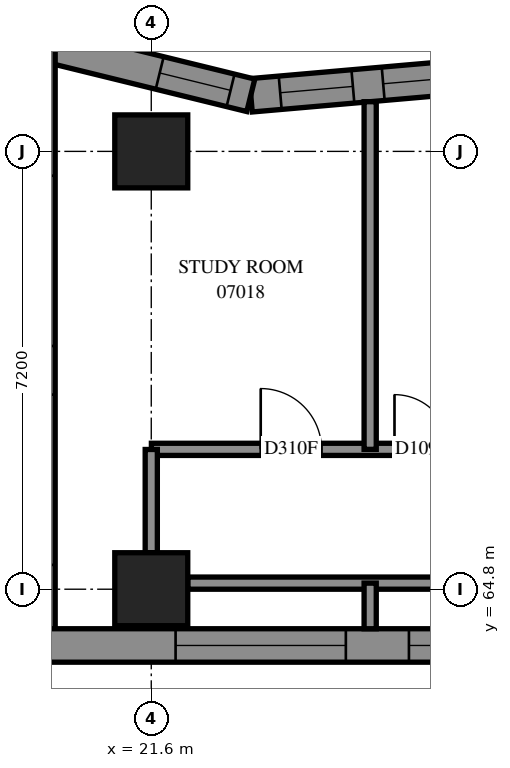
"""IFC4 building model, lengths in metres.
Left out: names, types, materials, properties, quantities, classifications, styles, units other than length and angle.
Written with IfcOpenShell. Run it as: python <this file> out.ifc"""

import sys

from ifc_helpers import new_model, si_unit, direction, frame, frame_2d, origin, origin_2d, place, context, subcontext, project, spatial, polyline, rectangle, outline, extrude, element, fill, save


model = new_model("IFC4")
c1 = context("Model", 3, precision=1e-05, world=origin(), true_north=direction((0.0, 1.0)))
c2 = subcontext(c1, "Body", "Model", "MODEL_VIEW")
j1 = project(units=[si_unit("LENGTHUNIT", "METRE"), si_unit("PLANEANGLEUNIT", "RADIAN")], contexts=[c1])
p1 = place(None, origin())
s1 = spatial("IfcSite", under=j1, at=p1, CompositionType="ELEMENT")
p2 = place(p1, origin())
s2 = spatial("IfcBuilding", under=s1, at=p2, CompositionType="ELEMENT")
p3 = place(p2, frame((0.0, 0.0, 30.4)))
s3 = spatial("IfcBuildingStorey", under=s2, at=p3, CompositionType="ELEMENT", Elevation=30.4)
for number, where, z_axis, x_axis in (
    (1, (21.6, 64.8, 0.0), (0.0, 0.0, 1.0), (1.0, 0.0, 0.0)),
    (2, (21.6, 72.0, 0.0), (0.0, 0.0, 1.0), (1.0, 0.0, 0.0)),
):
    element("IfcColumn", number, at=place(p3, frame(where, z_axis=z_axis, x_axis=x_axis)), inside=s3, PredefinedType="COLUMN", context=c2, shape_type="SweptSolid", body=[
        extrude(rectangle(XDim=1.2, YDim=1.2, at=origin_2d()), origin(), (0.0, 0.0, 1.0), 3.1),
    ])
p4 = place(p3, frame((27.047, 73.254, 0.0), z_axis=(0.0, 0.0, 1.0), x_axis=(-0.9962263466, -0.0867932393, 0.0)))
e3 = element("IfcWall", 3, at=p4, inside=s3, PredefinedType="SOLIDWALL", context=c2, shape_type="SweptSolid", body=[
    extrude(outline(polyline([(-0.024, -0.275), (3.779, -0.275), (3.87, 0.275), (0.024, 0.275), (-0.024, -0.275)])), origin(), (0.0, 0.0, 1.0), 3.1),
])
p5 = place(p4, frame((0.439, 0.0, 0.5)))
e4 = element("IfcOpeningElement", 4, at=p5, cuts=e3, PredefinedType="OPENING", context=c2, shape_type="SweptSolid", body=[
    extrude(rectangle(XDim=1.2, YDim=2.45, at=frame_2d((0.6, 1.225))), frame((0.0, 0.285, 0.0), z_axis=(0.0, -1.0, 0.0), x_axis=(1.0, 0.0, 0.0)), (0.0, 0.0, 1.0), 0.57),
])
p6 = place(p4, frame((2.139, 0.0, 0.5)))
e5 = element("IfcOpeningElement", 5, at=p6, cuts=e3, PredefinedType="OPENING", context=c2, shape_type="SweptSolid", body=[
    extrude(rectangle(XDim=1.2, YDim=2.45, at=frame_2d((0.6, 1.225))), frame((0.0, 0.285, 0.0), z_axis=(0.0, -1.0, 0.0), x_axis=(1.0, 0.0, 0.0)), (0.0, 0.0, 1.0), 0.57),
])
p7 = place(p3, frame((23.237, 72.922, 0.0), z_axis=(0.0, 0.0, 1.0), x_axis=(-0.9711660271, 0.2384041692, 0.0)))
e6 = element("IfcWall", 6, at=p7, inside=s3, PredefinedType="SOLIDWALL", context=c2, shape_type="SweptSolid", body=[
    extrude(outline(polyline([(0.045, -0.275), (3.946, -0.275), (3.245, 0.275), (-0.045, 0.275), (0.045, -0.275)])), origin(), (0.0, 0.0, 1.0), 3.1),
])
p8 = place(p7, frame((0.343, 0.0, 0.5)))
e7 = element("IfcOpeningElement", 7, at=p8, cuts=e6, PredefinedType="OPENING", context=c2, shape_type="SweptSolid", body=[
    extrude(rectangle(XDim=1.2, YDim=2.45, at=frame_2d((0.6, 1.225))), frame((0.0, 0.285, 0.0), z_axis=(0.0, -1.0, 0.0), x_axis=(1.0, 0.0, 0.0)), (0.0, 0.0, 1.0), 0.57),
])
p9 = place(p3, frame((19.745, 73.779, 0.0), z_axis=(0.0, 0.0, 1.0), x_axis=(0.0, -1.0, 0.0)))
e8 = element("IfcWall", 8, at=p9, inside=s3, PredefinedType="SOLIDWALL", context=c2, shape_type="SweptSolid", body=[
    extrude(outline(polyline([(-0.351, -0.275), (10.179, -0.275), (9.629, 0.275), (0.351, 0.275), (-0.351, -0.275)])), origin(), (0.0, 0.0, 1.0), 3.1),
])
p10 = place(p9, frame((2.179, 0.0, 0.5)))
e9 = element("IfcOpeningElement", 9, at=p10, cuts=e8, PredefinedType="OPENING", context=c2, shape_type="SweptSolid", body=[
    extrude(rectangle(XDim=2.8, YDim=2.45, at=frame_2d((1.4, 1.225))), frame((0.0, 0.285, 0.0), z_axis=(0.0, -1.0, 0.0), x_axis=(1.0, 0.0, 0.0)), (0.0, 0.0, 1.0), 0.57),
])
p11 = place(p9, frame((5.779, 0.0, 0.5)))
e10 = element("IfcOpeningElement", 10, at=p11, cuts=e8, PredefinedType="OPENING", context=c2, shape_type="SweptSolid", body=[
    extrude(rectangle(XDim=2.8, YDim=2.45, at=frame_2d((1.4, 1.225))), frame((0.0, 0.285, 0.0), z_axis=(0.0, -1.0, 0.0), x_axis=(1.0, 0.0, 0.0)), (0.0, 0.0, 1.0), 0.57),
])
p12 = place(p3, frame((19.745, 63.875, 0.0), z_axis=(0.0, 0.0, 1.0), x_axis=(1.0, 0.0, 0.0)))
e11 = element("IfcWall", 11, at=p12, inside=s3, PredefinedType="SOLIDWALL", context=c2, shape_type="SweptSolid", body=[
    extrude(outline(polyline([(-0.275, -0.275), (7.855, -0.275), (8.405, 0.275), (0.275, 0.275), (-0.275, -0.275)])), origin(), (0.0, 0.0, 1.0), 3.1),
])
p13 = place(p12, frame((2.255, 0.0, 0.5)))
e12 = element("IfcOpeningElement", 12, at=p13, cuts=e11, PredefinedType="OPENING", context=c2, shape_type="SweptSolid", body=[
    extrude(rectangle(XDim=2.8, YDim=2.45, at=frame_2d((1.4, 1.225))), frame((0.0, 0.285, 0.0), z_axis=(0.0, -1.0, 0.0), x_axis=(1.0, 0.0, 0.0)), (0.0, 0.0, 1.0), 0.57),
])
p14 = place(p12, frame((6.093, 0.0, 0.5)))
e13 = element("IfcOpeningElement", 13, at=p14, cuts=e11, PredefinedType="OPENING", context=c2, shape_type="SweptSolid", body=[
    extrude(rectangle(XDim=1.2, YDim=2.45, at=frame_2d((0.6, 1.225))), frame((0.0, 0.285, 0.0), z_axis=(0.0, -1.0, 0.0), x_axis=(1.0, 0.0, 0.0)), (0.0, 0.0, 1.0), 0.57),
])
p15 = place(p3, frame((21.602, 67.1, 0.0), z_axis=(0.0, 0.0, 1.0), x_axis=(1.0, 0.0, 0.0)))
e14 = element("IfcWall", 14, at=p15, inside=s3, PredefinedType="PARTITIONING", context=c2, shape_type="SweptSolid", body=[
    extrude(rectangle(XDim=11.898, YDim=0.2, at=frame_2d((5.949, 0.0))), origin(), (0.0, 0.0, 1.0), 3.1),
])
p16 = place(p15, frame((1.798, 0.0, 0.0)))
e15 = element("IfcOpeningElement", 15, at=p16, cuts=e14, PredefinedType="OPENING", context=c2, shape_type="SweptSolid", body=[
    extrude(rectangle(XDim=1.0, YDim=2.1, at=frame_2d((0.5, 1.05))), frame((0.0, 0.11, 0.0), z_axis=(0.0, -1.0, 0.0), x_axis=(1.0, 0.0, 0.0)), (0.0, 0.0, 1.0), 0.22),
])
p17 = place(p15, frame((3.998, 0.0, 0.0)))
e16 = element("IfcOpeningElement", 16, at=p17, cuts=e14, PredefinedType="OPENING", context=c2, shape_type="SweptSolid", body=[
    extrude(rectangle(XDim=0.9, YDim=2.1, at=frame_2d((0.45, 1.05))), frame((0.0, 0.11, 0.0), z_axis=(0.0, -1.0, 0.0), x_axis=(1.0, 0.0, 0.0)), (0.0, 0.0, 1.0), 0.22),
])
p18 = place(p15, frame((9.548, 0.0, 0.0)))
e17 = element("IfcOpeningElement", 17, at=p18, cuts=e14, PredefinedType="OPENING", context=c2, shape_type="SweptSolid", body=[
    extrude(rectangle(XDim=0.9, YDim=2.1, at=frame_2d((0.45, 1.05))), frame((0.0, 0.11, 0.0), z_axis=(0.0, -1.0, 0.0), x_axis=(1.0, 0.0, 0.0)), (0.0, 0.0, 1.0), 0.22),
])
p19 = place(p3, frame((22.2, 64.9, 0.0), z_axis=(0.0, 0.0, 1.0), x_axis=(1.0, 0.0, 0.0)))
e18 = element("IfcWall", 18, at=p19, inside=s3, PredefinedType="PARTITIONING", context=c2, shape_type="SweptSolid", body=[
    extrude(rectangle(XDim=6.0, YDim=0.2, at=frame_2d((3.0, 0.0))), origin(), (0.0, 0.0, 1.0), 2.6),
])
p20 = place(p3, frame((25.2, 67.1, 0.0), z_axis=(0.0, 0.0, 1.0), x_axis=(0.0, 1.0, 0.0)))
e19 = element("IfcWall", 19, at=p20, inside=s3, PredefinedType="PARTITIONING", context=c2, shape_type="SweptSolid", body=[
    extrude(rectangle(XDim=5.717, YDim=0.2, at=frame_2d((2.859, 0.0))), origin(), (0.0, 0.0, 1.0), 3.1),
])
p21 = place(p3, frame((21.6, 65.4, 0.0), z_axis=(0.0, 0.0, 1.0), x_axis=(0.0, 1.0, 0.0)))
e20 = element("IfcWall", 20, at=p21, inside=s3, PredefinedType="PARTITIONING", context=c2, shape_type="SweptSolid", body=[
    extrude(rectangle(XDim=1.698, YDim=0.2, at=frame_2d((0.849, 0.0))), origin(), (0.0, 0.0, 1.0), 2.6),
])
p22 = place(p3, frame((25.2, 64.15, 0.0), z_axis=(0.0, 0.0, 1.0), x_axis=(0.0, 1.0, 0.0)))
e21 = element("IfcWall", 21, at=p22, inside=s3, PredefinedType="PARTITIONING", context=c2, shape_type="SweptSolid", body=[
    extrude(rectangle(XDim=0.75, YDim=0.2, at=frame_2d((0.375, 0.0))), origin(), (0.0, 0.0, 1.0), 3.1),
])
p23 = place(p5, origin())
e22 = element("IfcWindow", 22, at=p23, inside=s3, PartitioningType="SINGLE_PANEL", PredefinedType="WINDOW", context=c2, shape_type="SweptSolid", body=[
    extrude(rectangle(XDim=1.2, YDim=2.45, at=frame_2d((0.6, 1.225))), frame((0.0, 0.155, 0.0), z_axis=(0.0, -1.0, 0.0), x_axis=(1.0, 0.0, 0.0)), (0.0, 0.0, 1.0), 0.06),
])
fill(e4, e22)
p24 = place(p6, origin())
e23 = element("IfcWindow", 23, at=p24, inside=s3, PartitioningType="SINGLE_PANEL", PredefinedType="WINDOW", context=c2, shape_type="SweptSolid", body=[
    extrude(rectangle(XDim=1.2, YDim=2.45, at=frame_2d((0.6, 1.225))), frame((0.0, 0.155, 0.0), z_axis=(0.0, -1.0, 0.0), x_axis=(1.0, 0.0, 0.0)), (0.0, 0.0, 1.0), 0.06),
])
fill(e5, e23)
p25 = place(p8, origin())
e24 = element("IfcWindow", 24, at=p25, inside=s3, PartitioningType="SINGLE_PANEL", PredefinedType="WINDOW", context=c2, shape_type="SweptSolid", body=[
    extrude(rectangle(XDim=1.2, YDim=2.45, at=frame_2d((0.6, 1.225))), frame((0.0, 0.155, 0.0), z_axis=(0.0, -1.0, 0.0), x_axis=(1.0, 0.0, 0.0)), (0.0, 0.0, 1.0), 0.06),
])
fill(e7, e24)
p26 = place(p13, origin())
e25 = element("IfcWindow", 25, at=p26, inside=s3, PartitioningType="SINGLE_PANEL", PredefinedType="WINDOW", context=c2, shape_type="SweptSolid", body=[
    extrude(rectangle(XDim=2.8, YDim=2.45, at=frame_2d((1.4, 1.225))), frame((0.0, 0.155, 0.0), z_axis=(0.0, -1.0, 0.0), x_axis=(1.0, 0.0, 0.0)), (0.0, 0.0, 1.0), 0.06),
])
fill(e12, e25)
p27 = place(p14, origin())
e26 = element("IfcWindow", 26, at=p27, inside=s3, PartitioningType="SINGLE_PANEL", PredefinedType="WINDOW", context=c2, shape_type="SweptSolid", body=[
    extrude(rectangle(XDim=1.2, YDim=2.45, at=frame_2d((0.6, 1.225))), frame((0.0, 0.155, 0.0), z_axis=(0.0, -1.0, 0.0), x_axis=(1.0, 0.0, 0.0)), (0.0, 0.0, 1.0), 0.06),
])
fill(e13, e26)
p28 = place(p16, origin())
e27 = element("IfcDoor", 27, at=p28, inside=s3, OperationType="SINGLE_SWING_RIGHT", PredefinedType="DOOR", context=c2, shape_type="SweptSolid", body=[
    extrude(rectangle(XDim=1.0, YDim=2.1, at=frame_2d((0.5, 1.05))), frame((0.0, 0.025, 0.0), z_axis=(0.0, -1.0, 0.0), x_axis=(1.0, 0.0, 0.0)), (0.0, 0.0, 1.0), 0.05),
])
fill(e15, e27)
p29 = place(p17, origin())
e28 = element("IfcDoor", 28, at=p29, inside=s3, OperationType="SINGLE_SWING_LEFT", PredefinedType="DOOR", context=c2, shape_type="SweptSolid", body=[
    extrude(rectangle(XDim=0.9, YDim=2.1, at=frame_2d((0.45, 1.05))), frame((0.0, 0.025, 0.0), z_axis=(0.0, -1.0, 0.0), x_axis=(1.0, 0.0, 0.0)), (0.0, 0.0, 1.0), 0.05),
])
fill(e16, e28)
save(model, sys.argv[1])
